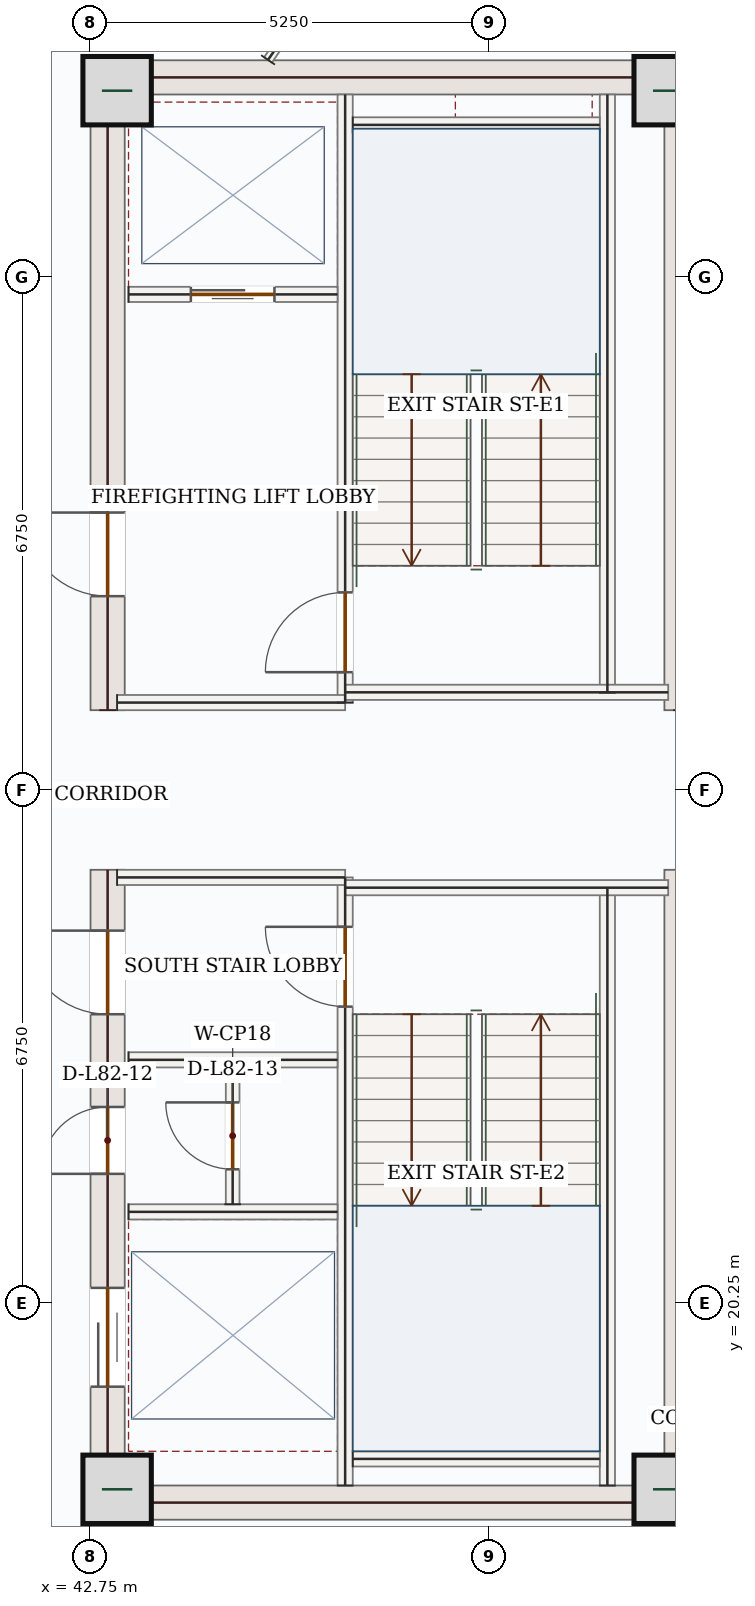
"""IFC4 building model, lengths in metres.
Left out: names, types, materials, properties, quantities, classifications, styles, units other than length and angle.
Written with IfcOpenShell. Run it as: python <this file> out.ifc"""

import sys

from ifc_helpers import new_model, si_unit, direction, frame, frame_2d, origin, origin_2d, place, context, subcontext, project, spatial, rectangle, extrude, source, transform, mapped, element, fill, save


model = new_model("IFC4")
c1 = context("Model", 3, precision=1e-05, world=origin(), true_north=direction((0.0, 1.0)))
c2 = subcontext(c1, "Body", "Model", "MODEL_VIEW")
j1 = project(units=[si_unit("LENGTHUNIT", "METRE"), si_unit("PLANEANGLEUNIT", "RADIAN")], contexts=[c1])
p1 = place(None, origin())
s1 = spatial("IfcSite", under=j1, at=p1, CompositionType="ELEMENT")
p2 = place(p1, origin())
s2 = spatial("IfcBuilding", under=s1, at=p2, CompositionType="ELEMENT")
p3 = place(p2, frame((0.0, 0.0, 338.55)))
s3 = spatial("IfcBuildingStorey", under=s2, at=p3, CompositionType="ELEMENT", Elevation=338.55)
p4 = place(p3, frame((42.975, 17.4, 0.0), z_axis=(0.0, 0.0, 1.0), x_axis=(0.0, 1.0, 0.0)))
e1 = element("IfcWall", 1, at=p4, inside=s3, PredefinedType="SHEAR", context=c2, shape_type="SweptSolid", body=[
    extrude(rectangle(XDim=8.55, YDim=0.45, at=frame_2d((4.275, 0.0))), origin(), (0.0, 0.0, 1.0), 3.5),
])
p5 = place(p4, frame((6.65, 0.0, 0.0)))
e2 = element("IfcOpeningElement", 2, at=p5, cuts=e1, PredefinedType="OPENING", context=c2, shape_type="SweptSolid", body=[
    extrude(rectangle(XDim=1.1, YDim=2.2, at=frame_2d((0.55, 1.1))), frame((0.0, 0.235, 0.0), z_axis=(0.0, -1.0, 0.0), x_axis=(1.0, 0.0, 0.0)), (0.0, 0.0, 1.0), 0.47),
])
p6 = place(p4, frame((1.75, 0.0, 0.0)))
e3 = element("IfcOpeningElement", 3, at=p6, cuts=e1, PredefinedType="OPENING", context=c2, shape_type="SweptSolid", body=[
    extrude(rectangle(XDim=1.3, YDim=2.2, at=frame_2d((0.65, 1.1))), frame((0.0, 0.235, 0.0), z_axis=(0.0, -1.0, 0.0), x_axis=(1.0, 0.0, 0.0)), (0.0, 0.0, 1.0), 0.47),
])
p7 = place(p4, frame((4.55, 0.0, 0.0)))
e4 = element("IfcOpeningElement", 4, at=p7, cuts=e1, PredefinedType="OPENING", context=c2, shape_type="SweptSolid", body=[
    extrude(rectangle(XDim=0.88, YDim=2.1, at=frame_2d((0.44, 1.05))), frame((0.0, 0.235, 0.0), z_axis=(0.0, -1.0, 0.0), x_axis=(1.0, 0.0, 0.0)), (0.0, 0.0, 1.0), 0.47),
])
p8 = place(p3, frame((42.975, 28.05, 0.0), z_axis=(0.0, 0.0, 1.0), x_axis=(0.0, 1.0, 0.0)))
e5 = element("IfcWall", 5, at=p8, inside=s3, PredefinedType="SHEAR", context=c2, shape_type="SweptSolid", body=[
    extrude(rectangle(XDim=8.55, YDim=0.45, at=frame_2d((4.275, 0.0))), origin(), (0.0, 0.0, 1.0), 3.5),
])
p9 = place(p8, frame((1.5, 0.0, 0.0)))
e6 = element("IfcOpeningElement", 6, at=p9, cuts=e5, PredefinedType="OPENING", context=c2, shape_type="SweptSolid", body=[
    extrude(rectangle(XDim=1.1, YDim=2.2, at=frame_2d((0.55, 1.1))), frame((0.0, 0.235, 0.0), z_axis=(0.0, -1.0, 0.0), x_axis=(1.0, 0.0, 0.0)), (0.0, 0.0, 1.0), 0.47),
])
m1 = source(origin(), c2, "Body", "SweptSolid", [
    extrude(rectangle(XDim=8.55, YDim=0.45, at=frame_2d((4.275, 0.0))), origin(), (0.0, 0.0, 1.0), 3.5),
])
for number, where, z_axis, x_axis in (
    (7, (50.525, 17.4, 0.0), (0.0, 0.0, 1.0), (0.0, 1.0, 0.0)),
    (8, (50.525, 28.05, 0.0), (0.0, 0.0, 1.0), (0.0, 1.0, 0.0)),
):
    element("IfcWall", number, at=place(p3, frame(where, z_axis=z_axis, x_axis=x_axis)), inside=s3, PredefinedType="SHEAR", context=c2, shape_type="MappedRepresentation", body=[
        mapped(m1, transform((0.0, 0.0, 0.0), x_axis=(1.0, 0.0, 0.0), y_axis=(0.0, 1.0, 0.0), z_axis=(0.0, 0.0, 1.0), scale=1.0)),
    ])
m2 = source(origin(), c2, "Body", "SweptSolid", [
    extrude(rectangle(XDim=7.1, YDim=0.45, at=frame_2d((3.55, 0.0))), origin(), (0.0, 0.0, 1.0), 3.5),
])
for number, where, z_axis, x_axis in (
    (9, (43.2, 17.625, 0.0), (0.0, 0.0, 1.0), (1.0, 0.0, 0.0)),
    (10, (43.2, 36.375, 0.0), (0.0, 0.0, 1.0), (1.0, 0.0, 0.0)),
):
    element("IfcWall", number, at=place(p3, frame(where, z_axis=z_axis, x_axis=x_axis)), inside=s3, PredefinedType="SHEAR", context=c2, shape_type="MappedRepresentation", body=[
        mapped(m2, transform((0.0, 0.0, 0.0), x_axis=(1.0, 0.0, 0.0), y_axis=(0.0, 1.0, 0.0), z_axis=(0.0, 0.0, 1.0), scale=1.0)),
    ])
m3 = source(origin(), c2, "Body", "SweptSolid", [
    extrude(rectangle(XDim=0.9, YDim=0.9, at=origin_2d()), origin(), (0.0, 0.0, 1.0), 3.75),
])
for number, where, z_axis, x_axis in (
    (11, (43.1, 17.8, 0.0), (0.0, 0.0, 1.0), (1.0, 0.0, 0.0)),
    (12, (50.35, 17.8, 0.0), (0.0, 0.0, 1.0), (1.0, 0.0, 0.0)),
    (13, (43.1, 36.2, 0.0), (0.0, 0.0, 1.0), (1.0, 0.0, 0.0)),
    (14, (50.35, 36.2, 0.0), (0.0, 0.0, 1.0), (1.0, 0.0, 0.0)),
):
    element("IfcColumn", number, at=place(p3, frame(where, z_axis=z_axis, x_axis=x_axis)), inside=s3, PredefinedType="COLUMN", context=c2, shape_type="MappedRepresentation", body=[
        mapped(m3, transform((0.0, 0.0, 0.0), x_axis=(1.0, 0.0, 0.0), y_axis=(0.0, 1.0, 0.0), z_axis=(0.0, 0.0, 1.0), scale=1.0)),
    ])
p10 = place(p3, frame((50.432, 38.17, 0.0), z_axis=(0.0, 0.0, 1.0), x_axis=(0.707106781187, -0.707106781187, 0.0)))
e15 = element("IfcWall", 15, at=p10, inside=s3, PredefinedType="SOLIDWALL", context=c2, shape_type="SweptSolid", body=[
    extrude(rectangle(XDim=3.716, YDim=0.28, at=frame_2d((1.858, 0.0))), origin(), (0.0, 0.0, 1.0), 3.5),
])
p11 = place(p10, frame((1.108, 0.0, 0.85)))
e16 = element("IfcOpeningElement", 16, at=p11, cuts=e15, PredefinedType="OPENING", context=c2, shape_type="SweptSolid", body=[
    extrude(rectangle(XDim=1.5, YDim=1.5, at=frame_2d((0.75, 0.75))), frame((0.0, 0.15, 0.0), z_axis=(0.0, -1.0, 0.0), x_axis=(1.0, 0.0, 0.0)), (0.0, 0.0, 1.0), 0.3),
])
m4 = source(origin(), c2, "Body", "SweptSolid", [
    extrude(rectangle(XDim=3.709, YDim=0.28, at=frame_2d((1.855, 0.0))), origin(), (0.0, 0.0, 1.0), 3.5),
])
p12 = place(p3, frame((53.06, 18.458, 0.0), z_axis=(0.0, 0.0, 1.0), x_axis=(-0.707106781187, -0.707106781187, 0.0)))
e17 = element("IfcWall", 17, at=p12, inside=s3, PredefinedType="SOLIDWALL", context=c2, shape_type="MappedRepresentation", body=[
    mapped(m4, transform((0.0, 0.0, 0.0), x_axis=(1.0, 0.0, 0.0), y_axis=(0.0, 1.0, 0.0), z_axis=(0.0, 0.0, 1.0), scale=1.0)),
])
m5 = source(origin(), c2, "Body", "SweptSolid", [
    extrude(rectangle(XDim=7.87, YDim=0.2, at=frame_2d((3.935, 0.0))), origin(), (0.0, 0.0, 1.0), 3.5),
])
for number, where, z_axis, x_axis in (
    (18, (49.55, 17.85, 0.0), (0.0, 0.0, 1.0), (0.0, 1.0, 0.0)),
    (19, (49.55, 28.28, 0.0), (0.0, 0.0, 1.0), (0.0, 1.0, 0.0)),
):
    element("IfcWall", number, at=place(p3, frame(where, z_axis=z_axis, x_axis=x_axis)), inside=s3, PredefinedType="SOLIDWALL", context=c2, shape_type="MappedRepresentation", body=[
        mapped(m5, transform((0.0, 0.0, 0.0), x_axis=(1.0, 0.0, 0.0), y_axis=(0.0, 1.0, 0.0), z_axis=(0.0, 0.0, 1.0), scale=1.0)),
    ])
p13 = place(p3, frame((46.1, 17.85, 0.0), z_axis=(0.0, 0.0, 1.0), x_axis=(0.0, 1.0, 0.0)))
e20 = element("IfcWall", 20, at=p13, inside=s3, PredefinedType="SOLIDWALL", context=c2, shape_type="SweptSolid", body=[
    extrude(rectangle(XDim=8.0, YDim=0.2, at=frame_2d((4.0, 0.0))), origin(), (0.0, 0.0, 1.0), 3.5),
])
p14 = place(p13, frame((6.3, 0.0, 0.0)))
e21 = element("IfcOpeningElement", 21, at=p14, cuts=e20, PredefinedType="OPENING", context=c2, shape_type="SweptSolid", body=[
    extrude(rectangle(XDim=1.05, YDim=2.15, at=frame_2d((0.525, 1.075))), frame((0.0, 0.11, 0.0), z_axis=(0.0, -1.0, 0.0), x_axis=(1.0, 0.0, 0.0)), (0.0, 0.0, 1.0), 0.22),
])
p15 = place(p3, frame((46.1, 28.15, 0.0), z_axis=(0.0, 0.0, 1.0), x_axis=(0.0, 1.0, 0.0)))
e22 = element("IfcWall", 22, at=p15, inside=s3, PredefinedType="SOLIDWALL", context=c2, shape_type="SweptSolid", body=[
    extrude(rectangle(XDim=8.0, YDim=0.2, at=frame_2d((4.0, 0.0))), origin(), (0.0, 0.0, 1.0), 3.5),
])
p16 = place(p15, frame((0.4, 0.0, 0.0)))
e23 = element("IfcOpeningElement", 23, at=p16, cuts=e22, PredefinedType="OPENING", context=c2, shape_type="SweptSolid", body=[
    extrude(rectangle(XDim=1.05, YDim=2.15, at=frame_2d((0.525, 1.075))), frame((0.0, 0.11, 0.0), z_axis=(0.0, -1.0, 0.0), x_axis=(1.0, 0.0, 0.0)), (0.0, 0.0, 1.0), 0.22),
])
m6 = source(origin(), c2, "Body", "SweptSolid", [
    extrude(rectangle(XDim=3.0, YDim=0.2, at=frame_2d((1.5, 0.0))), origin(), (0.0, 0.0, 1.0), 3.5),
])
p17 = place(p3, frame((43.1, 25.85, 0.0), z_axis=(0.0, 0.0, 1.0), x_axis=(1.0, 0.0, 0.0)))
e24 = element("IfcWall", 24, at=p17, inside=s3, PredefinedType="SOLIDWALL", context=c2, shape_type="MappedRepresentation", body=[
    mapped(m6, transform((0.0, 0.0, 0.0), x_axis=(1.0, 0.0, 0.0), y_axis=(0.0, 1.0, 0.0), z_axis=(0.0, 0.0, 1.0), scale=1.0)),
])
m7 = source(origin(), c2, "Body", "SweptSolid", [
    extrude(rectangle(XDim=4.25, YDim=0.2, at=frame_2d((2.125, 0.0))), origin(), (0.0, 0.0, 1.0), 3.5),
])
p18 = place(p3, frame((46.1, 25.715, 0.0), z_axis=(0.0, 0.0, 1.0), x_axis=(1.0, 0.0, 0.0)))
e25 = element("IfcWall", 25, at=p18, inside=s3, PredefinedType="SOLIDWALL", context=c2, shape_type="MappedRepresentation", body=[
    mapped(m7, transform((0.0, 0.0, 0.0), x_axis=(1.0, 0.0, 0.0), y_axis=(0.0, 1.0, 0.0), z_axis=(0.0, 0.0, 1.0), scale=1.0)),
])
p19 = place(p3, frame((43.1, 28.15, 0.0), z_axis=(0.0, 0.0, 1.0), x_axis=(1.0, 0.0, 0.0)))
e26 = element("IfcWall", 26, at=p19, inside=s3, PredefinedType="SOLIDWALL", context=c2, shape_type="MappedRepresentation", body=[
    mapped(m6, transform((0.0, 0.0, 0.0), x_axis=(1.0, 0.0, 0.0), y_axis=(0.0, 1.0, 0.0), z_axis=(0.0, 0.0, 1.0), scale=1.0)),
])
p20 = place(p3, frame((46.1, 28.285, 0.0), z_axis=(0.0, 0.0, 1.0), x_axis=(1.0, 0.0, 0.0)))
e27 = element("IfcWall", 27, at=p20, inside=s3, PredefinedType="SOLIDWALL", context=c2, shape_type="MappedRepresentation", body=[
    mapped(m7, transform((0.0, 0.0, 0.0), x_axis=(1.0, 0.0, 0.0), y_axis=(0.0, 1.0, 0.0), z_axis=(0.0, 0.0, 1.0), scale=1.0)),
])
m8 = source(origin(), c2, "Body", "SweptSolid", [
    extrude(rectangle(XDim=3.25, YDim=0.2, at=frame_2d((1.625, 0.0))), origin(), (0.0, 0.0, 1.0), 3.5),
])
for number, where, z_axis, x_axis in (
    (28, (46.2, 35.75, 0.0), (0.0, 0.0, 1.0), (1.0, 0.0, 0.0)),
    (29, (46.2, 18.2, 0.0), (0.0, 0.0, 1.0), (1.0, 0.0, 0.0)),
):
    element("IfcWall", number, at=place(p3, frame(where, z_axis=z_axis, x_axis=x_axis)), inside=s3, PredefinedType="SOLIDWALL", context=c2, shape_type="MappedRepresentation", body=[
        mapped(m8, transform((0.0, 0.0, 0.0), x_axis=(1.0, 0.0, 0.0), y_axis=(0.0, 1.0, 0.0), z_axis=(0.0, 0.0, 1.0), scale=1.0)),
    ])
p21 = place(p3, frame((43.25, 33.52, 0.0), z_axis=(0.0, 0.0, 1.0), x_axis=(1.0, 0.0, 0.0)))
e30 = element("IfcWall", 30, at=p21, inside=s3, PredefinedType="SOLIDWALL", context=c2, shape_type="SweptSolid", body=[
    extrude(rectangle(XDim=2.75, YDim=0.2, at=frame_2d((1.375, 0.0))), origin(), (0.0, 0.0, 1.0), 3.5),
])
p22 = place(p21, frame((0.82, 0.0, 0.0)))
e31 = element("IfcOpeningElement", 31, at=p22, cuts=e30, PredefinedType="OPENING", context=c2, shape_type="SweptSolid", body=[
    extrude(rectangle(XDim=1.1, YDim=2.15, at=frame_2d((0.55, 1.075))), frame((0.0, 0.11, 0.0), z_axis=(0.0, -1.0, 0.0), x_axis=(1.0, 0.0, 0.0)), (0.0, 0.0, 1.0), 0.22),
])
m9 = source(origin(), c2, "Body", "SweptSolid", [
    extrude(rectangle(XDim=2.75, YDim=0.2, at=frame_2d((1.375, 0.0))), origin(), (0.0, 0.0, 1.0), 3.5),
])
for number, where, z_axis, x_axis in (
    (32, (43.25, 23.45, 0.0), (0.0, 0.0, 1.0), (1.0, 0.0, 0.0)),
    (33, (43.25, 21.45, 0.0), (0.0, 0.0, 1.0), (1.0, 0.0, 0.0)),
):
    element("IfcWall", number, at=place(p3, frame(where, z_axis=z_axis, x_axis=x_axis)), inside=s3, PredefinedType="SOLIDWALL", context=c2, shape_type="MappedRepresentation", body=[
        mapped(m9, transform((0.0, 0.0, 0.0), x_axis=(1.0, 0.0, 0.0), y_axis=(0.0, 1.0, 0.0), z_axis=(0.0, 0.0, 1.0), scale=1.0)),
    ])
p23 = place(p3, frame((44.62, 21.55, 0.0), z_axis=(0.0, 0.0, 1.0), x_axis=(0.0, 1.0, 0.0)))
e34 = element("IfcWall", 34, at=p23, inside=s3, PredefinedType="PARTITIONING", context=c2, shape_type="SweptSolid", body=[
    extrude(rectangle(XDim=1.8, YDim=0.18, at=frame_2d((0.9, 0.0))), origin(), (0.0, 0.0, 1.0), 3.5),
])
p24 = place(p23, frame((0.46, 0.0, 0.0)))
e35 = element("IfcOpeningElement", 35, at=p24, cuts=e34, PredefinedType="OPENING", context=c2, shape_type="SweptSolid", body=[
    extrude(rectangle(XDim=0.88, YDim=2.1, at=frame_2d((0.44, 1.05))), frame((0.0, 0.1, 0.0), z_axis=(0.0, -1.0, 0.0), x_axis=(1.0, 0.0, 0.0)), (0.0, 0.0, 1.0), 0.2),
])
m10 = source(origin(), c2, "Body", "SweptSolid", [
    extrude(rectangle(XDim=2.511, YDim=0.125, at=frame_2d((1.255, 0.0))), origin(), (0.0, 0.0, 1.0), 3.5),
])
p25 = place(p3, frame((45.085, 36.605, 0.0), z_axis=(0.0, 0.0, 1.0), x_axis=(0.564980194272, 0.825104466162, 0.0)))
e36 = element("IfcWall", 36, at=p25, inside=s3, PredefinedType="PARTITIONING", context=c2, shape_type="MappedRepresentation", body=[
    mapped(m10, transform((0.0, 0.0, 0.0), x_axis=(1.0, 0.0, 0.0), y_axis=(0.0, 1.0, 0.0), z_axis=(0.0, 0.0, 1.0), scale=1.0)),
])
m11 = source(origin(), c2, "Body", "SweptSolid", [
    extrude(rectangle(XDim=1.05, YDim=2.15, at=frame_2d((0.525, 1.075))), frame((0.0, 0.025, 0.0), z_axis=(0.0, -1.0, 0.0), x_axis=(1.0, 0.0, 0.0)), (0.0, 0.0, 1.0), 0.05),
])
p26 = place(p16, origin())
e37 = element("IfcDoor", 37, at=p26, inside=s3, OperationType="SINGLE_SWING_LEFT", PredefinedType="DOOR", context=c2, shape_type="MappedRepresentation", body=[
    mapped(m11, transform((0.0, 0.0, 0.0), x_axis=(1.0, 0.0, 0.0), y_axis=(0.0, 1.0, 0.0), z_axis=(0.0, 0.0, 1.0), scale=1.0)),
])
fill(e23, e37)
p27 = place(p14, origin())
e38 = element("IfcDoor", 38, at=p27, inside=s3, OperationType="SINGLE_SWING_RIGHT", PredefinedType="DOOR", context=c2, shape_type="MappedRepresentation", body=[
    mapped(m11, transform((0.0, 0.0, 0.0), x_axis=(1.0, 0.0, 0.0), y_axis=(0.0, 1.0, 0.0), z_axis=(0.0, 0.0, 1.0), scale=1.0)),
])
fill(e21, e38)
m12 = source(origin(), c2, "Body", "SweptSolid", [
    extrude(rectangle(XDim=1.1, YDim=2.15, at=frame_2d((0.55, 1.075))), frame((0.0, 0.025, 0.0), z_axis=(0.0, -1.0, 0.0), x_axis=(1.0, 0.0, 0.0)), (0.0, 0.0, 1.0), 0.05),
])
p28 = place(p22, origin())
e39 = element("IfcDoor", 39, at=p28, inside=s3, OperationType="DOUBLE_DOOR_SLIDING", PredefinedType="DOOR", context=c2, shape_type="MappedRepresentation", body=[
    mapped(m12, transform((0.0, 0.0, 0.0), x_axis=(1.0, 0.0, 0.0), y_axis=(0.0, 1.0, 0.0), z_axis=(0.0, 0.0, 1.0), scale=1.0)),
])
fill(e31, e39)
m13 = source(origin(), c2, "Body", "SweptSolid", [
    extrude(rectangle(XDim=1.1, YDim=2.2, at=frame_2d((0.55, 1.1))), frame((0.0, 0.025, 0.0), z_axis=(0.0, -1.0, 0.0), x_axis=(1.0, 0.0, 0.0)), (0.0, 0.0, 1.0), 0.05),
])
p29 = place(p9, origin())
e40 = element("IfcDoor", 40, at=p29, inside=s3, OperationType="SINGLE_SWING_RIGHT", PredefinedType="DOOR", context=c2, shape_type="MappedRepresentation", body=[
    mapped(m13, transform((0.0, 0.0, 0.0), x_axis=(1.0, 0.0, 0.0), y_axis=(0.0, 1.0, 0.0), z_axis=(0.0, 0.0, 1.0), scale=1.0)),
])
fill(e6, e40)
p30 = place(p5, origin())
e41 = element("IfcDoor", 41, at=p30, inside=s3, OperationType="SINGLE_SWING_RIGHT", PredefinedType="DOOR", context=c2, shape_type="MappedRepresentation", body=[
    mapped(m13, transform((0.0, 0.0, 0.0), x_axis=(1.0, 0.0, 0.0), y_axis=(0.0, 1.0, 0.0), z_axis=(0.0, 0.0, 1.0), scale=1.0)),
])
fill(e2, e41)
m14 = source(origin(), c2, "Body", "SweptSolid", [
    extrude(rectangle(XDim=1.3, YDim=2.2, at=frame_2d((0.65, 1.1))), frame((0.0, 0.025, 0.0), z_axis=(0.0, -1.0, 0.0), x_axis=(1.0, 0.0, 0.0)), (0.0, 0.0, 1.0), 0.05),
])
p31 = place(p6, origin())
e42 = element("IfcDoor", 42, at=p31, inside=s3, OperationType="DOUBLE_DOOR_SLIDING", PredefinedType="DOOR", context=c2, shape_type="MappedRepresentation", body=[
    mapped(m14, transform((0.0, 0.0, 0.0), x_axis=(1.0, 0.0, 0.0), y_axis=(0.0, 1.0, 0.0), z_axis=(0.0, 0.0, 1.0), scale=1.0)),
])
fill(e3, e42)
m15 = source(origin(), c2, "Body", "SweptSolid", [
    extrude(rectangle(XDim=0.88, YDim=2.1, at=frame_2d((0.44, 1.05))), frame((0.0, 0.025, 0.0), z_axis=(0.0, -1.0, 0.0), x_axis=(1.0, 0.0, 0.0)), (0.0, 0.0, 1.0), 0.05),
])
p32 = place(p7, origin())
e43 = element("IfcDoor", 43, at=p32, inside=s3, OperationType="SINGLE_SWING_LEFT", PredefinedType="DOOR", context=c2, shape_type="MappedRepresentation", body=[
    mapped(m15, transform((0.0, 0.0, 0.0), x_axis=(1.0, 0.0, 0.0), y_axis=(0.0, 1.0, 0.0), z_axis=(0.0, 0.0, 1.0), scale=1.0)),
])
fill(e4, e43)
p33 = place(p24, origin())
e44 = element("IfcDoor", 44, at=p33, inside=s3, OperationType="SINGLE_SWING_RIGHT", PredefinedType="DOOR", context=c2, shape_type="MappedRepresentation", body=[
    mapped(m15, transform((0.0, 0.0, 0.0), x_axis=(1.0, 0.0, 0.0), y_axis=(0.0, 1.0, 0.0), z_axis=(0.0, 0.0, 1.0), scale=1.0)),
])
fill(e35, e44)
save(model, sys.argv[1])
